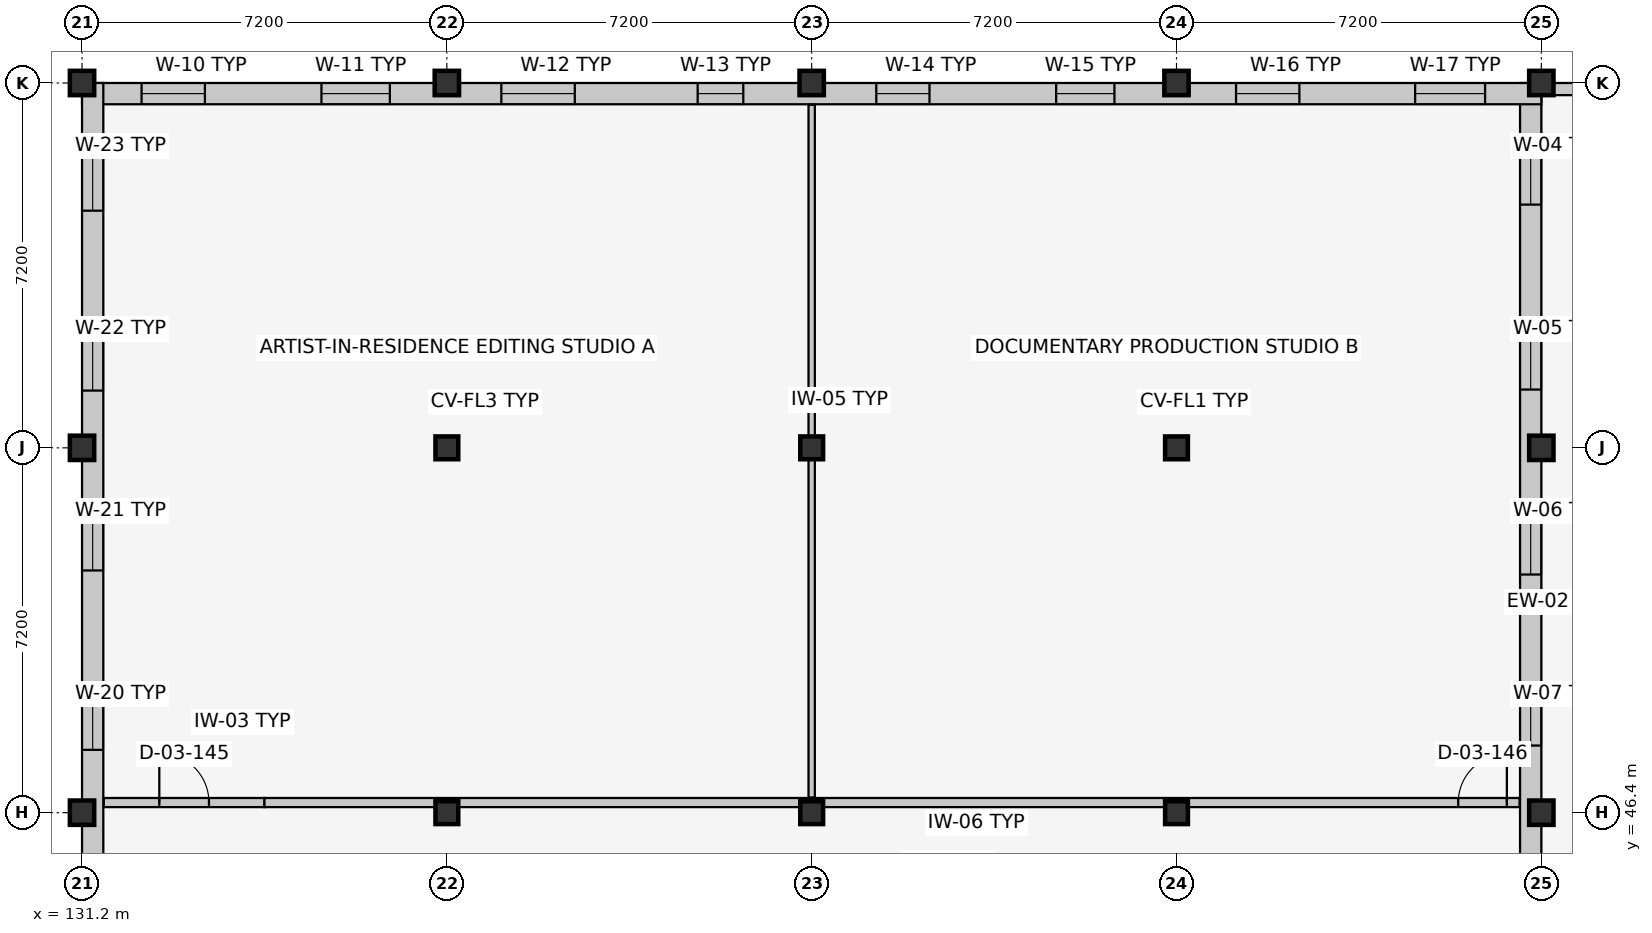
"""IFC4 building model, lengths in metres.
Left out: names, types, materials, properties, quantities, classifications, styles, units other than length and angle.
Written with IfcOpenShell. Run it as: python <this file> out.ifc"""

import sys

from ifc_helpers import new_model, si_unit, direction, frame, frame_2d, origin, origin_2d, place, context, subcontext, project, spatial, rectangle, extrude, element, fill, save


model = new_model("IFC4")
c1 = context("Model", 3, precision=1e-05, world=origin(), true_north=direction((0.0, 1.0)))
c2 = subcontext(c1, "Body", "Model", "MODEL_VIEW")
j1 = project(units=[si_unit("LENGTHUNIT", "METRE"), si_unit("PLANEANGLEUNIT", "RADIAN")], contexts=[c1])
p1 = place(None, origin())
s1 = spatial("IfcSite", under=j1, at=p1, CompositionType="ELEMENT")
p2 = place(p1, origin())
s2 = spatial("IfcBuilding", under=s1, at=p2, CompositionType="ELEMENT")
p3 = place(p2, frame((0.0, 0.0, 13.8)))
s3 = spatial("IfcBuildingStorey", under=s2, at=p3, CompositionType="ELEMENT", Elevation=13.8)
for number, where, z_axis, x_axis in (
    (1, (131.2, 46.4, 0.0), (0.0, 0.0, 1.0), (1.0, 0.0, 0.0)),
    (2, (131.2, 53.6, 0.0), (0.0, 0.0, 1.0), (1.0, 0.0, 0.0)),
    (3, (131.2, 60.8, 0.0), (0.0, 0.0, 1.0), (1.0, 0.0, 0.0)),
):
    element("IfcColumn", number, at=place(p3, frame(where, z_axis=z_axis, x_axis=x_axis)), inside=s3, PredefinedType="COLUMN", context=c2, shape_type="SweptSolid", body=[
        extrude(rectangle(XDim=0.48, YDim=0.48, at=origin_2d()), origin(), (0.0, 0.0, 1.0), 4.2),
    ])
for number, where, z_axis, x_axis in (
    (4, (138.4, 46.4, 0.0), (0.0, 0.0, 1.0), (1.0, 0.0, 0.0)),
    (5, (138.4, 53.6, 0.0), (0.0, 0.0, 1.0), (1.0, 0.0, 0.0)),
):
    element("IfcColumn", number, at=place(p3, frame(where, z_axis=z_axis, x_axis=x_axis)), inside=s3, PredefinedType="COLUMN", context=c2, shape_type="SweptSolid", body=[
        extrude(rectangle(XDim=0.45, YDim=0.45, at=origin_2d()), origin(), (0.0, 0.0, 1.0), 4.2),
    ])
p4 = place(p3, frame((138.4, 60.8, 0.0), z_axis=(0.0, 0.0, 1.0), x_axis=(1.0, 0.0, 0.0)))
e6 = element("IfcColumn", 6, at=p4, inside=s3, PredefinedType="COLUMN", context=c2, shape_type="SweptSolid", body=[
    extrude(rectangle(XDim=0.48, YDim=0.48, at=origin_2d()), origin(), (0.0, 0.0, 1.0), 4.2),
])
for number, where, z_axis, x_axis in (
    (7, (145.6, 46.4, 0.0), (0.0, 0.0, 1.0), (1.0, 0.0, 0.0)),
    (8, (145.6, 53.6, 0.0), (0.0, 0.0, 1.0), (1.0, 0.0, 0.0)),
):
    element("IfcColumn", number, at=place(p3, frame(where, z_axis=z_axis, x_axis=x_axis)), inside=s3, PredefinedType="COLUMN", context=c2, shape_type="SweptSolid", body=[
        extrude(rectangle(XDim=0.45, YDim=0.45, at=origin_2d()), origin(), (0.0, 0.0, 1.0), 4.2),
    ])
p5 = place(p3, frame((145.6, 60.8, 0.0), z_axis=(0.0, 0.0, 1.0), x_axis=(1.0, 0.0, 0.0)))
e9 = element("IfcColumn", 9, at=p5, inside=s3, PredefinedType="COLUMN", context=c2, shape_type="SweptSolid", body=[
    extrude(rectangle(XDim=0.48, YDim=0.48, at=origin_2d()), origin(), (0.0, 0.0, 1.0), 4.2),
])
for number, where, z_axis, x_axis in (
    (10, (152.8, 46.4, 0.0), (0.0, 0.0, 1.0), (1.0, 0.0, 0.0)),
    (11, (152.8, 53.6, 0.0), (0.0, 0.0, 1.0), (1.0, 0.0, 0.0)),
):
    element("IfcColumn", number, at=place(p3, frame(where, z_axis=z_axis, x_axis=x_axis)), inside=s3, PredefinedType="COLUMN", context=c2, shape_type="SweptSolid", body=[
        extrude(rectangle(XDim=0.45, YDim=0.45, at=origin_2d()), origin(), (0.0, 0.0, 1.0), 4.2),
    ])
for number, where, z_axis, x_axis in (
    (12, (152.8, 60.8, 0.0), (0.0, 0.0, 1.0), (1.0, 0.0, 0.0)),
    (13, (160.0, 46.4, 0.0), (0.0, 0.0, 1.0), (1.0, 0.0, 0.0)),
    (14, (160.0, 53.6, 0.0), (0.0, 0.0, 1.0), (1.0, 0.0, 0.0)),
    (15, (160.0, 60.8, 0.0), (0.0, 0.0, 1.0), (1.0, 0.0, 0.0)),
):
    element("IfcColumn", number, at=place(p3, frame(where, z_axis=z_axis, x_axis=x_axis)), inside=s3, PredefinedType="COLUMN", context=c2, shape_type="SweptSolid", body=[
        extrude(rectangle(XDim=0.48, YDim=0.48, at=origin_2d()), origin(), (0.0, 0.0, 1.0), 4.2),
    ])
p6 = place(p3, frame((159.79, 60.8, 0.0), z_axis=(0.0, 0.0, 1.0), x_axis=(0.0, -1.0, 0.0)))
e16 = element("IfcWall", 16, at=p6, inside=s3, PredefinedType="SOLIDWALL", context=c2, shape_type="SweptSolid", body=[
    extrude(rectangle(XDim=21.6, YDim=0.42, at=frame_2d((10.8, 0.0))), origin(), (0.0, 0.0, 1.0), 3.215),
])
p7 = place(p6, frame((1.2, 0.0, 0.9)))
e17 = element("IfcOpeningElement", 17, at=p7, cuts=e16, PredefinedType="OPENING", context=c2, shape_type="SweptSolid", body=[
    extrude(rectangle(XDim=1.2, YDim=1.35, at=frame_2d((0.6, 0.675))), frame((0.0, 0.222, 0.0), z_axis=(0.0, -1.0, 0.0), x_axis=(1.0, 0.0, 0.0)), (0.0, 0.0, 1.0), 0.444),
])
p8 = place(p6, frame((4.75, 0.0, 0.9)))
e18 = element("IfcOpeningElement", 18, at=p8, cuts=e16, PredefinedType="OPENING", context=c2, shape_type="SweptSolid", body=[
    extrude(rectangle(XDim=1.3, YDim=1.35, at=frame_2d((0.65, 0.675))), frame((0.0, 0.222, 0.0), z_axis=(0.0, -1.0, 0.0), x_axis=(1.0, 0.0, 0.0)), (0.0, 0.0, 1.0), 0.444),
])
p9 = place(p6, frame((8.3, 0.0, 0.9)))
e19 = element("IfcOpeningElement", 19, at=p9, cuts=e16, PredefinedType="OPENING", context=c2, shape_type="SweptSolid", body=[
    extrude(rectangle(XDim=1.4, YDim=1.35, at=frame_2d((0.7, 0.675))), frame((0.0, 0.222, 0.0), z_axis=(0.0, -1.0, 0.0), x_axis=(1.0, 0.0, 0.0)), (0.0, 0.0, 1.0), 0.444),
])
p10 = place(p6, frame((12.125, 0.0, 0.9)))
e20 = element("IfcOpeningElement", 20, at=p10, cuts=e16, PredefinedType="OPENING", context=c2, shape_type="SweptSolid", body=[
    extrude(rectangle(XDim=0.95, YDim=1.45, at=frame_2d((0.475, 0.725))), frame((0.0, 0.222, 0.0), z_axis=(0.0, -1.0, 0.0), x_axis=(1.0, 0.0, 0.0)), (0.0, 0.0, 1.0), 0.444),
])
p11 = place(p6, frame((19.225, 0.0, 0.9)))
e21 = element("IfcOpeningElement", 21, at=p11, cuts=e16, PredefinedType="OPENING", context=c2, shape_type="SweptSolid", body=[
    extrude(rectangle(XDim=1.15, YDim=1.45, at=frame_2d((0.575, 0.725))), frame((0.0, 0.222, 0.0), z_axis=(0.0, -1.0, 0.0), x_axis=(1.0, 0.0, 0.0)), (0.0, 0.0, 1.0), 0.444),
])
p12 = place(p3, frame((131.2, 60.59, 0.0), z_axis=(0.0, 0.0, 1.0), x_axis=(1.0, 0.0, 0.0)))
e22 = element("IfcWall", 22, at=p12, inside=s3, PredefinedType="SOLIDWALL", context=c2, shape_type="SweptSolid", body=[
    extrude(rectangle(XDim=28.8, YDim=0.42, at=frame_2d((14.4, 0.0))), origin(), (0.0, 0.0, 1.0), 3.255),
])
p13 = place(p12, frame((1.175, 0.0, 0.9)))
e23 = element("IfcOpeningElement", 23, at=p13, cuts=e22, PredefinedType="OPENING", context=c2, shape_type="SweptSolid", body=[
    extrude(rectangle(XDim=1.25, YDim=1.45, at=frame_2d((0.625, 0.725))), frame((0.0, 0.222, 0.0), z_axis=(0.0, -1.0, 0.0), x_axis=(1.0, 0.0, 0.0)), (0.0, 0.0, 1.0), 0.444),
])
p14 = place(p12, frame((4.725, 0.0, 0.9)))
e24 = element("IfcOpeningElement", 24, at=p14, cuts=e22, PredefinedType="OPENING", context=c2, shape_type="SweptSolid", body=[
    extrude(rectangle(XDim=1.35, YDim=1.45, at=frame_2d((0.675, 0.725))), frame((0.0, 0.222, 0.0), z_axis=(0.0, -1.0, 0.0), x_axis=(1.0, 0.0, 0.0)), (0.0, 0.0, 1.0), 0.444),
])
p15 = place(p12, frame((8.275, 0.0, 0.9)))
e25 = element("IfcOpeningElement", 25, at=p15, cuts=e22, PredefinedType="OPENING", context=c2, shape_type="SweptSolid", body=[
    extrude(rectangle(XDim=1.45, YDim=1.45, at=frame_2d((0.725, 0.725))), frame((0.0, 0.222, 0.0), z_axis=(0.0, -1.0, 0.0), x_axis=(1.0, 0.0, 0.0)), (0.0, 0.0, 1.0), 0.444),
])
p16 = place(p12, frame((12.15, 0.0, 0.9)))
e26 = element("IfcOpeningElement", 26, at=p16, cuts=e22, PredefinedType="OPENING", context=c2, shape_type="SweptSolid", body=[
    extrude(rectangle(XDim=0.9, YDim=1.6, at=frame_2d((0.45, 0.8))), frame((0.0, 0.222, 0.0), z_axis=(0.0, -1.0, 0.0), x_axis=(1.0, 0.0, 0.0)), (0.0, 0.0, 1.0), 0.444),
])
p17 = place(p12, frame((15.675, 0.0, 0.9)))
e27 = element("IfcOpeningElement", 27, at=p17, cuts=e22, PredefinedType="OPENING", context=c2, shape_type="SweptSolid", body=[
    extrude(rectangle(XDim=1.05, YDim=1.6, at=frame_2d((0.525, 0.8))), frame((0.0, 0.222, 0.0), z_axis=(0.0, -1.0, 0.0), x_axis=(1.0, 0.0, 0.0)), (0.0, 0.0, 1.0), 0.444),
])
p18 = place(p12, frame((19.225, 0.0, 0.9)))
e28 = element("IfcOpeningElement", 28, at=p18, cuts=e22, PredefinedType="OPENING", context=c2, shape_type="SweptSolid", body=[
    extrude(rectangle(XDim=1.15, YDim=1.6, at=frame_2d((0.575, 0.8))), frame((0.0, 0.222, 0.0), z_axis=(0.0, -1.0, 0.0), x_axis=(1.0, 0.0, 0.0)), (0.0, 0.0, 1.0), 0.444),
])
p19 = place(p12, frame((22.775, 0.0, 0.9)))
e29 = element("IfcOpeningElement", 29, at=p19, cuts=e22, PredefinedType="OPENING", context=c2, shape_type="SweptSolid", body=[
    extrude(rectangle(XDim=1.25, YDim=1.6, at=frame_2d((0.625, 0.8))), frame((0.0, 0.222, 0.0), z_axis=(0.0, -1.0, 0.0), x_axis=(1.0, 0.0, 0.0)), (0.0, 0.0, 1.0), 0.444),
])
p20 = place(p12, frame((26.31, 0.0, 0.9)))
e30 = element("IfcOpeningElement", 30, at=p20, cuts=e22, PredefinedType="OPENING", context=c2, shape_type="SweptSolid", body=[
    extrude(rectangle(XDim=1.38, YDim=1.6, at=frame_2d((0.69, 0.8))), frame((0.0, 0.222, 0.0), z_axis=(0.0, -1.0, 0.0), x_axis=(1.0, 0.0, 0.0)), (0.0, 0.0, 1.0), 0.444),
])
p21 = place(p3, frame((131.41, 39.2, 0.0), z_axis=(0.0, 0.0, 1.0), x_axis=(0.0, 1.0, 0.0)))
e31 = element("IfcWall", 31, at=p21, inside=s3, PredefinedType="SOLIDWALL", context=c2, shape_type="SweptSolid", body=[
    extrude(rectangle(XDim=21.6, YDim=0.42, at=frame_2d((10.8, 0.0))), origin(), (0.0, 0.0, 1.0), 3.215),
])
p22 = place(p21, frame((1.05, 0.0, 0.9)))
e32 = element("IfcOpeningElement", 32, at=p22, cuts=e31, PredefinedType="OPENING", context=c2, shape_type="SweptSolid", body=[
    extrude(rectangle(XDim=1.5, YDim=1.6, at=frame_2d((0.75, 0.8))), frame((0.0, 0.222, 0.0), z_axis=(0.0, -1.0, 0.0), x_axis=(1.0, 0.0, 0.0)), (0.0, 0.0, 1.0), 0.444),
])
p23 = place(p21, frame((4.9, 0.0, 0.9)))
e33 = element("IfcOpeningElement", 33, at=p23, cuts=e31, PredefinedType="OPENING", context=c2, shape_type="SweptSolid", body=[
    extrude(rectangle(XDim=1.0, YDim=1.75, at=frame_2d((0.5, 0.875))), frame((0.0, 0.222, 0.0), z_axis=(0.0, -1.0, 0.0), x_axis=(1.0, 0.0, 0.0)), (0.0, 0.0, 1.0), 0.444),
])
p24 = place(p21, frame((8.44, 0.0, 0.9)))
e34 = element("IfcOpeningElement", 34, at=p24, cuts=e31, PredefinedType="OPENING", context=c2, shape_type="SweptSolid", body=[
    extrude(rectangle(XDim=1.12, YDim=1.75, at=frame_2d((0.56, 0.875))), frame((0.0, 0.222, 0.0), z_axis=(0.0, -1.0, 0.0), x_axis=(1.0, 0.0, 0.0)), (0.0, 0.0, 1.0), 0.444),
])
p25 = place(p21, frame((11.98, 0.0, 0.9)))
e35 = element("IfcOpeningElement", 35, at=p25, cuts=e31, PredefinedType="OPENING", context=c2, shape_type="SweptSolid", body=[
    extrude(rectangle(XDim=1.24, YDim=1.75, at=frame_2d((0.62, 0.875))), frame((0.0, 0.222, 0.0), z_axis=(0.0, -1.0, 0.0), x_axis=(1.0, 0.0, 0.0)), (0.0, 0.0, 1.0), 0.444),
])
p26 = place(p21, frame((15.53, 0.0, 0.9)))
e36 = element("IfcOpeningElement", 36, at=p26, cuts=e31, PredefinedType="OPENING", context=c2, shape_type="SweptSolid", body=[
    extrude(rectangle(XDim=1.34, YDim=1.75, at=frame_2d((0.67, 0.875))), frame((0.0, 0.222, 0.0), z_axis=(0.0, -1.0, 0.0), x_axis=(1.0, 0.0, 0.0)), (0.0, 0.0, 1.0), 0.444),
])
p27 = place(p21, frame((19.08, 0.0, 0.9)))
e37 = element("IfcOpeningElement", 37, at=p27, cuts=e31, PredefinedType="OPENING", context=c2, shape_type="SweptSolid", body=[
    extrude(rectangle(XDim=1.44, YDim=1.75, at=frame_2d((0.72, 0.875))), frame((0.0, 0.222, 0.0), z_axis=(0.0, -1.0, 0.0), x_axis=(1.0, 0.0, 0.0)), (0.0, 0.0, 1.0), 0.444),
])
p28 = place(p3, frame((160.15, 60.68, 0.0), z_axis=(0.0, 0.0, 1.0), x_axis=(1.0, 0.0, 0.0)))
e38 = element("IfcWall", 38, at=p28, inside=s3, PredefinedType="PARAPET", context=c2, shape_type="SweptSolid", body=[
    extrude(rectangle(XDim=8.1, YDim=0.24, at=frame_2d((4.05, 0.0))), origin(), (0.0, 0.0, 1.0), 0.65),
])
p29 = place(p3, frame((131.63, 46.6, 0.0), z_axis=(0.0, 0.0, 1.0), x_axis=(1.0, 0.0, 0.0)))
e39 = element("IfcWall", 39, at=p29, inside=s3, PredefinedType="PARTITIONING", context=c2, shape_type="SweptSolid", body=[
    extrude(rectangle(XDim=3.17, YDim=0.18, at=frame_2d((1.585, 0.0))), origin(), (0.0, 0.0, 1.0), 3.235),
])
p30 = place(p29, frame((1.095, 0.0, 0.0)))
e40 = element("IfcOpeningElement", 40, at=p30, cuts=e39, PredefinedType="OPENING", context=c2, shape_type="SweptSolid", body=[
    extrude(rectangle(XDim=0.98, YDim=2.12, at=frame_2d((0.49, 1.06))), frame((0.0, 0.102, 0.0), z_axis=(0.0, -1.0, 0.0), x_axis=(1.0, 0.0, 0.0)), (0.0, 0.0, 1.0), 0.204),
])
p31 = place(p3, frame((134.8, 46.6, 0.0), z_axis=(0.0, 0.0, 1.0), x_axis=(1.0, 0.0, 0.0)))
e41 = element("IfcWall", 41, at=p31, inside=s3, PredefinedType="PARTITIONING", context=c2, shape_type="SweptSolid", body=[
    extrude(rectangle(XDim=24.77, YDim=0.18, at=frame_2d((12.385, 0.0))), origin(), (0.0, 0.0, 1.0), 3.085),
])
p32 = place(p31, frame((23.56, 0.0, 0.0)))
e42 = element("IfcOpeningElement", 42, at=p32, cuts=e41, PredefinedType="OPENING", context=c2, shape_type="SweptSolid", body=[
    extrude(rectangle(XDim=0.96, YDim=2.1, at=frame_2d((0.48, 1.05))), frame((0.0, 0.102, 0.0), z_axis=(0.0, -1.0, 0.0), x_axis=(1.0, 0.0, 0.0)), (0.0, 0.0, 1.0), 0.204),
])
p33 = place(p3, frame((145.6, 46.7, 0.0), z_axis=(0.0, 0.0, 1.0), x_axis=(0.0, 1.0, 0.0)))
e43 = element("IfcWall", 43, at=p33, inside=s3, PredefinedType="PARTITIONING", context=c2, shape_type="SweptSolid", body=[
    extrude(rectangle(XDim=13.67, YDim=0.125, at=frame_2d((6.835, 0.0))), origin(), (0.0, 0.0, 1.0), 3.335),
])
p34 = place(p7, origin())
e44 = element("IfcWindow", 44, at=p34, inside=s3, PartitioningType="SINGLE_PANEL", PredefinedType="WINDOW", context=c2, shape_type="SweptSolid", body=[
    extrude(rectangle(XDim=1.2, YDim=1.35, at=frame_2d((0.6, 0.675))), frame((0.0, 0.03, 0.0), z_axis=(0.0, -1.0, 0.0), x_axis=(1.0, 0.0, 0.0)), (0.0, 0.0, 1.0), 0.06),
])
fill(e17, e44)
p35 = place(p8, origin())
e45 = element("IfcWindow", 45, at=p35, inside=s3, PartitioningType="SINGLE_PANEL", PredefinedType="WINDOW", context=c2, shape_type="SweptSolid", body=[
    extrude(rectangle(XDim=1.3, YDim=1.35, at=frame_2d((0.65, 0.675))), frame((0.0, 0.03, 0.0), z_axis=(0.0, -1.0, 0.0), x_axis=(1.0, 0.0, 0.0)), (0.0, 0.0, 1.0), 0.06),
])
fill(e18, e45)
p36 = place(p9, origin())
e46 = element("IfcWindow", 46, at=p36, inside=s3, PartitioningType="SINGLE_PANEL", PredefinedType="WINDOW", context=c2, shape_type="SweptSolid", body=[
    extrude(rectangle(XDim=1.4, YDim=1.35, at=frame_2d((0.7, 0.675))), frame((0.0, 0.03, 0.0), z_axis=(0.0, -1.0, 0.0), x_axis=(1.0, 0.0, 0.0)), (0.0, 0.0, 1.0), 0.06),
])
fill(e19, e46)
p37 = place(p10, origin())
e47 = element("IfcWindow", 47, at=p37, inside=s3, PartitioningType="SINGLE_PANEL", PredefinedType="WINDOW", context=c2, shape_type="SweptSolid", body=[
    extrude(rectangle(XDim=0.95, YDim=1.45, at=frame_2d((0.475, 0.725))), frame((0.0, 0.03, 0.0), z_axis=(0.0, -1.0, 0.0), x_axis=(1.0, 0.0, 0.0)), (0.0, 0.0, 1.0), 0.06),
])
fill(e20, e47)
p38 = place(p13, origin())
e48 = element("IfcWindow", 48, at=p38, inside=s3, PartitioningType="SINGLE_PANEL", PredefinedType="WINDOW", context=c2, shape_type="SweptSolid", body=[
    extrude(rectangle(XDim=1.25, YDim=1.45, at=frame_2d((0.625, 0.725))), frame((0.0, 0.03, 0.0), z_axis=(0.0, -1.0, 0.0), x_axis=(1.0, 0.0, 0.0)), (0.0, 0.0, 1.0), 0.06),
])
fill(e23, e48)
p39 = place(p14, origin())
e49 = element("IfcWindow", 49, at=p39, inside=s3, PartitioningType="SINGLE_PANEL", PredefinedType="WINDOW", context=c2, shape_type="SweptSolid", body=[
    extrude(rectangle(XDim=1.35, YDim=1.45, at=frame_2d((0.675, 0.725))), frame((0.0, 0.03, 0.0), z_axis=(0.0, -1.0, 0.0), x_axis=(1.0, 0.0, 0.0)), (0.0, 0.0, 1.0), 0.06),
])
fill(e24, e49)
p40 = place(p15, origin())
e50 = element("IfcWindow", 50, at=p40, inside=s3, PartitioningType="SINGLE_PANEL", PredefinedType="WINDOW", context=c2, shape_type="SweptSolid", body=[
    extrude(rectangle(XDim=1.45, YDim=1.45, at=frame_2d((0.725, 0.725))), frame((0.0, 0.03, 0.0), z_axis=(0.0, -1.0, 0.0), x_axis=(1.0, 0.0, 0.0)), (0.0, 0.0, 1.0), 0.06),
])
fill(e25, e50)
p41 = place(p16, origin())
e51 = element("IfcWindow", 51, at=p41, inside=s3, PartitioningType="SINGLE_PANEL", PredefinedType="WINDOW", context=c2, shape_type="SweptSolid", body=[
    extrude(rectangle(XDim=0.9, YDim=1.6, at=frame_2d((0.45, 0.8))), frame((0.0, 0.03, 0.0), z_axis=(0.0, -1.0, 0.0), x_axis=(1.0, 0.0, 0.0)), (0.0, 0.0, 1.0), 0.06),
])
fill(e26, e51)
p42 = place(p17, origin())
e52 = element("IfcWindow", 52, at=p42, inside=s3, PartitioningType="SINGLE_PANEL", PredefinedType="WINDOW", context=c2, shape_type="SweptSolid", body=[
    extrude(rectangle(XDim=1.05, YDim=1.6, at=frame_2d((0.525, 0.8))), frame((0.0, 0.03, 0.0), z_axis=(0.0, -1.0, 0.0), x_axis=(1.0, 0.0, 0.0)), (0.0, 0.0, 1.0), 0.06),
])
fill(e27, e52)
p43 = place(p18, origin())
e53 = element("IfcWindow", 53, at=p43, inside=s3, PartitioningType="SINGLE_PANEL", PredefinedType="WINDOW", context=c2, shape_type="SweptSolid", body=[
    extrude(rectangle(XDim=1.15, YDim=1.6, at=frame_2d((0.575, 0.8))), frame((0.0, 0.03, 0.0), z_axis=(0.0, -1.0, 0.0), x_axis=(1.0, 0.0, 0.0)), (0.0, 0.0, 1.0), 0.06),
])
fill(e28, e53)
p44 = place(p19, origin())
e54 = element("IfcWindow", 54, at=p44, inside=s3, PartitioningType="SINGLE_PANEL", PredefinedType="WINDOW", context=c2, shape_type="SweptSolid", body=[
    extrude(rectangle(XDim=1.25, YDim=1.6, at=frame_2d((0.625, 0.8))), frame((0.0, 0.03, 0.0), z_axis=(0.0, -1.0, 0.0), x_axis=(1.0, 0.0, 0.0)), (0.0, 0.0, 1.0), 0.06),
])
fill(e29, e54)
p45 = place(p20, origin())
e55 = element("IfcWindow", 55, at=p45, inside=s3, PartitioningType="SINGLE_PANEL", PredefinedType="WINDOW", context=c2, shape_type="SweptSolid", body=[
    extrude(rectangle(XDim=1.38, YDim=1.6, at=frame_2d((0.69, 0.8))), frame((0.0, 0.03, 0.0), z_axis=(0.0, -1.0, 0.0), x_axis=(1.0, 0.0, 0.0)), (0.0, 0.0, 1.0), 0.06),
])
fill(e30, e55)
p46 = place(p24, origin())
e56 = element("IfcWindow", 56, at=p46, inside=s3, PartitioningType="SINGLE_PANEL", PredefinedType="WINDOW", context=c2, shape_type="SweptSolid", body=[
    extrude(rectangle(XDim=1.12, YDim=1.75, at=frame_2d((0.56, 0.875))), frame((0.0, 0.03, 0.0), z_axis=(0.0, -1.0, 0.0), x_axis=(1.0, 0.0, 0.0)), (0.0, 0.0, 1.0), 0.06),
])
fill(e34, e56)
p47 = place(p25, origin())
e57 = element("IfcWindow", 57, at=p47, inside=s3, PartitioningType="SINGLE_PANEL", PredefinedType="WINDOW", context=c2, shape_type="SweptSolid", body=[
    extrude(rectangle(XDim=1.24, YDim=1.75, at=frame_2d((0.62, 0.875))), frame((0.0, 0.03, 0.0), z_axis=(0.0, -1.0, 0.0), x_axis=(1.0, 0.0, 0.0)), (0.0, 0.0, 1.0), 0.06),
])
fill(e35, e57)
p48 = place(p26, origin())
e58 = element("IfcWindow", 58, at=p48, inside=s3, PartitioningType="SINGLE_PANEL", PredefinedType="WINDOW", context=c2, shape_type="SweptSolid", body=[
    extrude(rectangle(XDim=1.34, YDim=1.75, at=frame_2d((0.67, 0.875))), frame((0.0, 0.03, 0.0), z_axis=(0.0, -1.0, 0.0), x_axis=(1.0, 0.0, 0.0)), (0.0, 0.0, 1.0), 0.06),
])
fill(e36, e58)
p49 = place(p27, origin())
e59 = element("IfcWindow", 59, at=p49, inside=s3, PartitioningType="SINGLE_PANEL", PredefinedType="WINDOW", context=c2, shape_type="SweptSolid", body=[
    extrude(rectangle(XDim=1.44, YDim=1.75, at=frame_2d((0.72, 0.875))), frame((0.0, 0.03, 0.0), z_axis=(0.0, -1.0, 0.0), x_axis=(1.0, 0.0, 0.0)), (0.0, 0.0, 1.0), 0.06),
])
fill(e37, e59)
p50 = place(p30, origin())
e60 = element("IfcDoor", 60, at=p50, inside=s3, OperationType="SINGLE_SWING_LEFT", PredefinedType="DOOR", context=c2, shape_type="SweptSolid", body=[
    extrude(rectangle(XDim=0.98, YDim=2.12, at=frame_2d((0.49, 1.06))), frame((0.0, 0.025, 0.0), z_axis=(0.0, -1.0, 0.0), x_axis=(1.0, 0.0, 0.0)), (0.0, 0.0, 1.0), 0.05),
])
fill(e40, e60)
p51 = place(p32, origin())
e61 = element("IfcDoor", 61, at=p51, inside=s3, OperationType="SINGLE_SWING_RIGHT", PredefinedType="DOOR", context=c2, shape_type="SweptSolid", body=[
    extrude(rectangle(XDim=0.96, YDim=2.1, at=frame_2d((0.48, 1.05))), frame((0.0, 0.025, 0.0), z_axis=(0.0, -1.0, 0.0), x_axis=(1.0, 0.0, 0.0)), (0.0, 0.0, 1.0), 0.05),
])
fill(e42, e61)
save(model, sys.argv[1])
